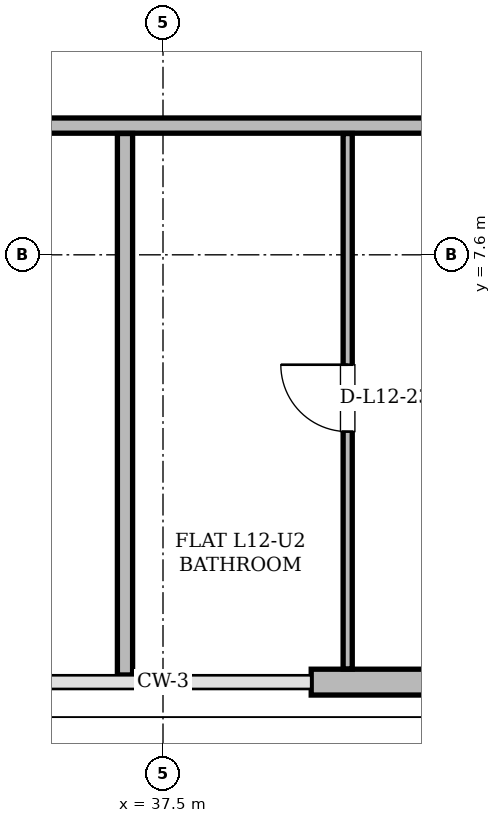
"""IFC4 building model, lengths in metres.
Left out: names, types, materials, properties, quantities, classifications, styles, units other than length and angle.
Written with IfcOpenShell. Run it as: python <this file> out.ifc"""

import sys

from ifc_helpers import new_model, si_unit, direction, frame, frame_2d, origin, place, context, subcontext, project, spatial, rectangle, extrude, element, fill, save


model = new_model("IFC4")
c1 = context("Model", 3, precision=1e-05, world=origin(), true_north=direction((0.0, 1.0)))
c2 = subcontext(c1, "Body", "Model", "MODEL_VIEW")
j1 = project(units=[si_unit("LENGTHUNIT", "METRE"), si_unit("PLANEANGLEUNIT", "RADIAN")], contexts=[c1])
p1 = place(None, origin())
s1 = spatial("IfcSite", under=j1, at=p1, CompositionType="ELEMENT")
p2 = place(p1, origin())
s2 = spatial("IfcBuilding", under=s1, at=p2, CompositionType="ELEMENT")
p3 = place(p2, frame((0.0, 0.0, 48.9)))
s3 = spatial("IfcBuildingStorey", under=s2, at=p3, CompositionType="ELEMENT", Elevation=48.9)
p4 = place(p3, frame((39.45, 1.978, 0.0), z_axis=(0.0, 0.0, 1.0), x_axis=(1.0, 0.0, 0.0)))
e1 = element("IfcWall", 1, at=p4, inside=s3, PredefinedType="SOLIDWALL", context=c2, shape_type="SweptSolid", body=[
    extrude(rectangle(XDim=14.704, YDim=0.34, at=frame_2d((7.352, 0.0))), origin(), (0.0, 0.0, 1.0), 2.494),
])
p5 = place(p4, frame((5.59, 0.0, 0.0)))
e2 = element("IfcOpeningElement", 2, at=p5, cuts=e1, PredefinedType="OPENING", context=c2, shape_type="SweptSolid", body=[
    extrude(rectangle(XDim=1.5, YDim=2.2, at=frame_2d((0.75, 1.1))), frame((0.0, 0.17, 0.0), z_axis=(0.0, -1.0, 0.0), x_axis=(1.0, 0.0, 0.0)), (0.0, 0.0, 1.0), 0.34),
])
p6 = place(p4, frame((1.676, 0.0, 0.85)))
e3 = element("IfcOpeningElement", 3, at=p6, cuts=e1, PredefinedType="OPENING", context=c2, shape_type="SweptSolid", body=[
    extrude(rectangle(XDim=1.8, YDim=1.534, at=frame_2d((0.9, 0.767))), frame((0.0, 0.17, 0.0), z_axis=(0.0, -1.0, 0.0), x_axis=(1.0, 0.0, 0.0)), (0.0, 0.0, 1.0), 0.34),
])
p7 = place(p4, frame((11.353, 0.0, 0.85)))
e4 = element("IfcOpeningElement", 4, at=p7, cuts=e1, PredefinedType="OPENING", context=c2, shape_type="SweptSolid", body=[
    extrude(rectangle(XDim=2.2, YDim=1.534, at=frame_2d((1.1, 0.767))), frame((0.0, 0.17, 0.0), z_axis=(0.0, -1.0, 0.0), x_axis=(1.0, 0.0, 0.0)), (0.0, 0.0, 1.0), 0.34),
])
p8 = place(p3, frame((19.2, 9.3, 0.0), z_axis=(0.0, 0.0, 1.0), x_axis=(1.0, 0.0, 0.0)))
e5 = element("IfcWall", 5, at=p8, inside=s3, PredefinedType="PARTITIONING", context=c2, shape_type="SweptSolid", body=[
    extrude(rectangle(XDim=36.6, YDim=0.2, at=frame_2d((18.3, 0.0))), origin(), (0.0, 0.0, 1.0), 2.738),
])
p9 = place(p8, frame((8.527, 0.0, 0.0)))
e6 = element("IfcOpeningElement", 6, at=p9, cuts=e5, PredefinedType="OPENING", context=c2, shape_type="SweptSolid", body=[
    extrude(rectangle(XDim=1.0, YDim=2.18, at=frame_2d((0.5, 1.09))), frame((0.0, 0.1, 0.0), z_axis=(0.0, -1.0, 0.0), x_axis=(1.0, 0.0, 0.0)), (0.0, 0.0, 1.0), 0.2),
])
p10 = place(p8, frame((24.062, 0.0, 0.0)))
e7 = element("IfcOpeningElement", 7, at=p10, cuts=e5, PredefinedType="OPENING", context=c2, shape_type="SweptSolid", body=[
    extrude(rectangle(XDim=1.0, YDim=2.18, at=frame_2d((0.5, 1.09))), frame((0.0, 0.1, 0.0), z_axis=(0.0, -1.0, 0.0), x_axis=(1.0, 0.0, 0.0)), (0.0, 0.0, 1.0), 0.2),
])
p11 = place(p8, frame((31.904, 0.0, 0.0)))
e8 = element("IfcOpeningElement", 8, at=p11, cuts=e5, PredefinedType="OPENING", context=c2, shape_type="SweptSolid", body=[
    extrude(rectangle(XDim=1.0, YDim=2.18, at=frame_2d((0.5, 1.09))), frame((0.0, 0.1, 0.0), z_axis=(0.0, -1.0, 0.0), x_axis=(1.0, 0.0, 0.0)), (0.0, 0.0, 1.0), 0.2),
])
p12 = place(p3, frame((37.0, 2.072, 0.0), z_axis=(0.0, 0.0, 1.0), x_axis=(0.0, 1.0, 0.0)))
e9 = element("IfcWall", 9, at=p12, inside=s3, PredefinedType="PARTITIONING", context=c2, shape_type="SweptSolid", body=[
    extrude(rectangle(XDim=7.124, YDim=0.2, at=frame_2d((3.562, 0.0))), origin(), (0.0, 0.0, 1.0), 2.494),
])
p13 = place(p3, frame((39.93, 2.152, 0.0), z_axis=(0.0, 0.0, 1.0), x_axis=(0.0, 1.0, 0.0)))
e10 = element("IfcWall", 10, at=p13, inside=s3, PredefinedType="PARTITIONING", context=c2, shape_type="SweptSolid", body=[
    extrude(rectangle(XDim=7.044, YDim=0.12, at=frame_2d((3.522, 0.0))), origin(), (0.0, 0.0, 1.0), 3.36),
])
p14 = place(p13, frame((3.122, 0.0, 0.0)))
e11 = element("IfcOpeningElement", 11, at=p14, cuts=e10, PredefinedType="OPENING", context=c2, shape_type="SweptSolid", body=[
    extrude(rectangle(XDim=0.88, YDim=2.08, at=frame_2d((0.44, 1.04))), frame((0.0, 0.06, 0.0), z_axis=(0.0, -1.0, 0.0), x_axis=(1.0, 0.0, 0.0)), (0.0, 0.0, 1.0), 0.12),
])
p15 = place(p14, origin())
e12 = element("IfcDoor", 12, at=p15, inside=s3, OperationType="SINGLE_SWING_RIGHT", PredefinedType="DOOR", context=c2, shape_type="SweptSolid", body=[
    extrude(rectangle(XDim=0.88, YDim=2.08, at=frame_2d((0.44, 1.04))), frame((0.0, 0.025, 0.0), z_axis=(0.0, -1.0, 0.0), x_axis=(1.0, 0.0, 0.0)), (0.0, 0.0, 1.0), 0.05),
])
fill(e11, e12)
save(model, sys.argv[1])
